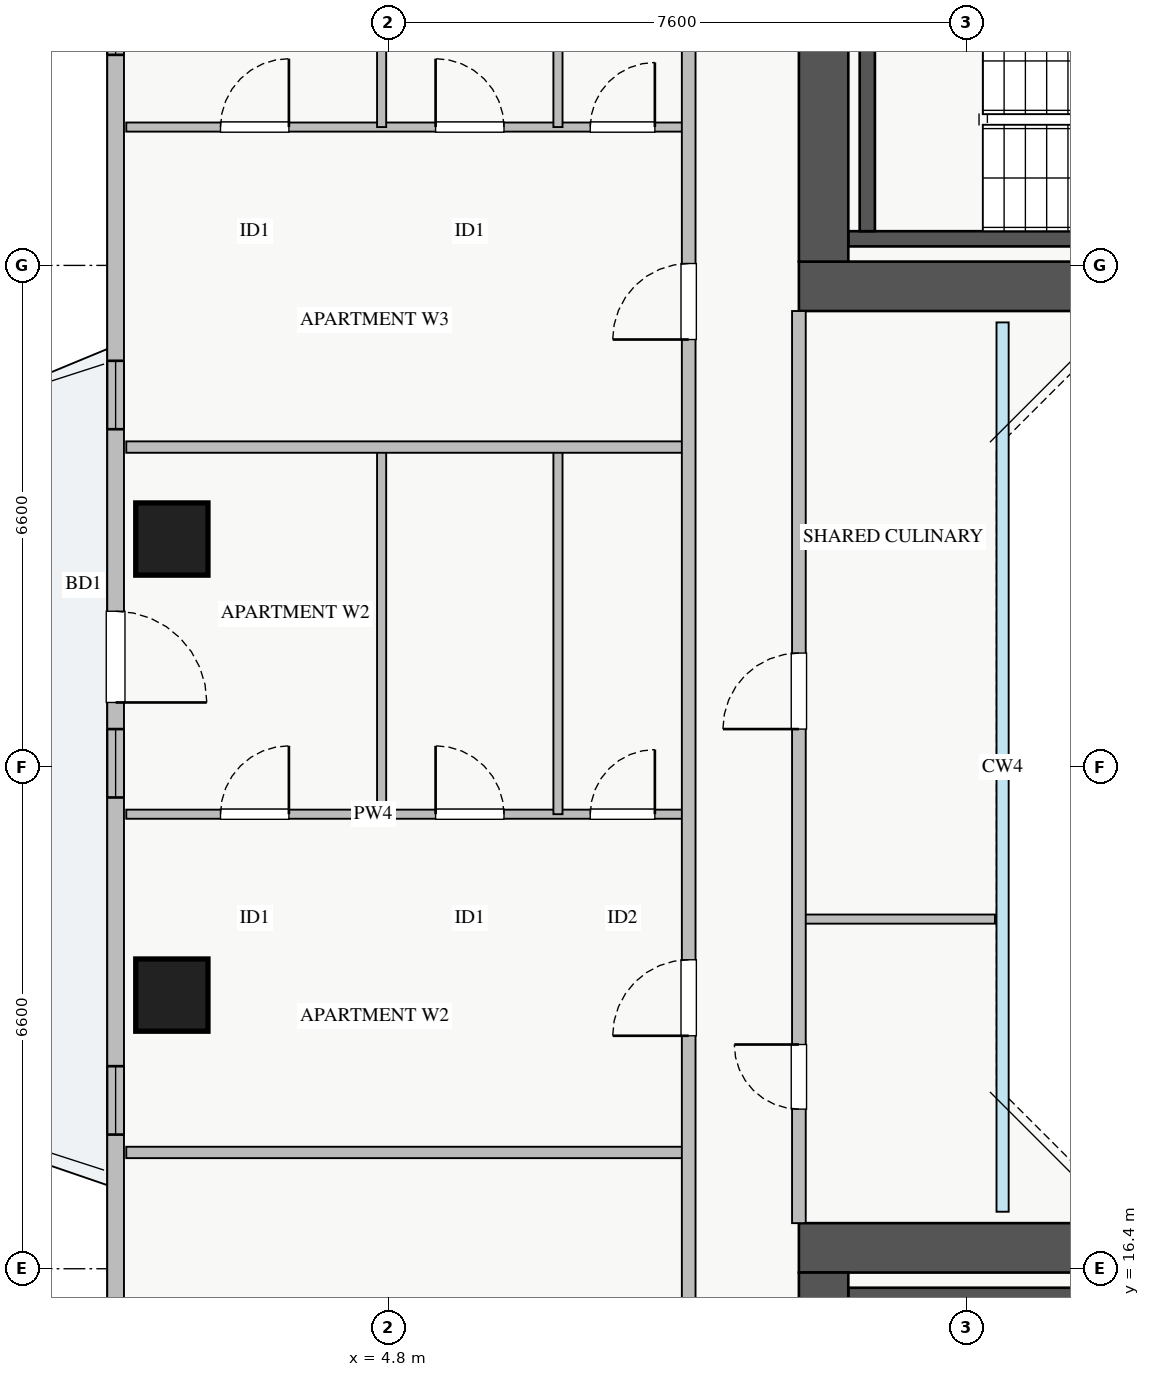
"""IFC4 building model, lengths in metres.
Left out: names, types, materials, properties, quantities, classifications, styles, units other than length and angle.
Written with IfcOpenShell. Run it as: python <this file> out.ifc"""

import sys

from ifc_helpers import new_model, si_unit, direction, frame, frame_2d, origin, origin_2d, place, context, subcontext, project, spatial, rectangle, extrude, source, transform, mapped, element, fill, save


model = new_model("IFC4")
c1 = context("Model", 3, precision=1e-05, world=origin(), true_north=direction((0.0, 1.0)))
c2 = subcontext(c1, "Body", "Model", "MODEL_VIEW")
j1 = project(units=[si_unit("LENGTHUNIT", "METRE"), si_unit("PLANEANGLEUNIT", "RADIAN")], contexts=[c1])
p1 = place(None, origin())
s1 = spatial("IfcSite", under=j1, at=p1, CompositionType="ELEMENT")
p2 = place(p1, origin())
s2 = spatial("IfcBuilding", under=s1, at=p2, CompositionType="ELEMENT")
p3 = place(p2, frame((0.0, 0.0, 150.25)))
s3 = spatial("IfcBuildingStorey", under=s2, at=p3, CompositionType="ELEMENT", Elevation=150.25)
p4 = place(p3, frame((10.85, 29.95, 0.0), z_axis=(0.0, 0.0, 1.0), x_axis=(1.0, 0.0, 0.0)))
e1 = element("IfcWall", 1, at=p4, inside=s3, PredefinedType="SHEAR", context=c2, shape_type="SweptSolid", body=[
    extrude(rectangle(XDim=7.3, YDim=0.2, at=frame_2d((3.65, 0.0))), origin(), (0.0, 0.0, 1.0), 3.25),
])
p5 = place(p3, frame((11.1, 30.05, 0.0), z_axis=(0.0, 0.0, 1.0), x_axis=(0.0, 1.0, 0.0)))
e2 = element("IfcWall", 2, at=p5, inside=s3, PredefinedType="SHEAR", context=c2, shape_type="SweptSolid", body=[
    extrude(rectangle(XDim=2.94, YDim=0.2, at=frame_2d((1.47, 0.0))), origin(), (0.0, 0.0, 1.0), 3.25),
])
p6 = place(p3, frame((10.85, 16.05, 0.0), z_axis=(0.0, 0.0, 1.0), x_axis=(1.0, 0.0, 0.0)))
e3 = element("IfcWall", 3, at=p6, inside=s3, PredefinedType="SHEAR", context=c2, shape_type="SweptSolid", body=[
    extrude(rectangle(XDim=7.3, YDim=0.2, at=frame_2d((3.65, 0.0))), origin(), (0.0, 0.0, 1.0), 3.25),
])
p7 = place(p3, frame((10.2, 29.325, 0.0), z_axis=(0.0, 0.0, 1.0), x_axis=(1.0, 0.0, 0.0)))
e4 = element("IfcWall", 4, at=p7, inside=s3, PredefinedType="SHEAR", context=c2, shape_type="SweptSolid", body=[
    extrude(rectangle(XDim=17.6, YDim=0.65, at=frame_2d((8.8, 0.0))), origin(), (0.0, 0.0, 1.0), 3.25),
])
p8 = place(p3, frame((10.525, 29.65, 0.0), z_axis=(0.0, 0.0, 1.0), x_axis=(0.0, 1.0, 0.0)))
e5 = element("IfcWall", 5, at=p8, inside=s3, PredefinedType="SHEAR", context=c2, shape_type="SweptSolid", body=[
    extrude(rectangle(XDim=5.9, YDim=0.65, at=frame_2d((2.95, 0.0))), origin(), (0.0, 0.0, 1.0), 3.25),
])
p9 = place(p3, frame((10.2, 16.675, 0.0), z_axis=(0.0, 0.0, 1.0), x_axis=(1.0, 0.0, 0.0)))
e6 = element("IfcWall", 6, at=p9, inside=s3, PredefinedType="SHEAR", context=c2, shape_type="SweptSolid", body=[
    extrude(rectangle(XDim=17.6, YDim=0.65, at=frame_2d((8.8, 0.0))), origin(), (0.0, 0.0, 1.0), 3.25),
])
p10 = place(p3, frame((10.525, 10.45, 0.0), z_axis=(0.0, 0.0, 1.0), x_axis=(0.0, 1.0, 0.0)))
e7 = element("IfcWall", 7, at=p10, inside=s3, PredefinedType="SHEAR", context=c2, shape_type="SweptSolid", body=[
    extrude(rectangle(XDim=5.9, YDim=0.65, at=frame_2d((2.95, 0.0))), origin(), (0.0, 0.0, 1.0), 3.25),
])
m1 = source(origin(), c2, "Body", "SweptSolid", [
    extrude(rectangle(XDim=0.95, YDim=0.95, at=origin_2d()), origin(), (0.0, 0.0, 1.0), 3.25),
])
for number, where, z_axis, x_axis in (
    (8, (1.95, 26.0, 0.0), (0.0, 0.0, 1.0), (1.0, 0.0, 0.0)),
    (9, (1.95, 20.0, 0.0), (0.0, 0.0, 1.0), (1.0, 0.0, 0.0)),
):
    element("IfcColumn", number, at=place(p3, frame(where, z_axis=z_axis, x_axis=x_axis)), inside=s3, PredefinedType="COLUMN", context=c2, shape_type="MappedRepresentation", body=[
        mapped(m1, transform((0.0, 0.0, 0.0), x_axis=(1.0, 0.0, 0.0), y_axis=(0.0, 1.0, 0.0), z_axis=(0.0, 0.0, 1.0), scale=1.0)),
    ])
p11 = place(p3, frame((1.21, 10.55, 0.0), z_axis=(0.0, 0.0, 1.0), x_axis=(0.0, 1.0, 0.0)))
e10 = element("IfcWall", 10, at=p11, inside=s3, PredefinedType="STANDARD", context=c2, shape_type="SweptSolid", body=[
    extrude(rectangle(XDim=24.9, YDim=0.22, at=frame_2d((12.45, 0.0))), origin(), (0.0, 0.0, 1.0), 2.61),
])
p12 = place(p11, frame((13.3, 0.0, 0.0)))
e11 = element("IfcOpeningElement", 11, at=p12, cuts=e10, PredefinedType="OPENING", context=c2, shape_type="SweptSolid", body=[
    extrude(rectangle(XDim=1.2, YDim=2.1, at=frame_2d((0.6, 1.05))), frame((0.0, 0.12, 0.0), z_axis=(0.0, -1.0, 0.0), x_axis=(1.0, 0.0, 0.0)), (0.0, 0.0, 1.0), 0.24),
])
p13 = place(p11, frame((1.912, 0.0, 0.9)))
e12 = element("IfcOpeningElement", 12, at=p13, cuts=e10, PredefinedType="OPENING", context=c2, shape_type="SweptSolid", body=[
    extrude(rectangle(XDim=2.4, YDim=1.48, at=frame_2d((1.2, 0.74))), frame((0.0, 0.12, 0.0), z_axis=(0.0, -1.0, 0.0), x_axis=(1.0, 0.0, 0.0)), (0.0, 0.0, 1.0), 0.24),
])
p14 = place(p11, frame((21.82, 0.0, 0.9)))
e13 = element("IfcOpeningElement", 13, at=p14, cuts=e10, PredefinedType="OPENING", context=c2, shape_type="SweptSolid", body=[
    extrude(rectangle(XDim=2.1, YDim=1.5, at=frame_2d((1.05, 0.75))), frame((0.0, 0.12, 0.0), z_axis=(0.0, -1.0, 0.0), x_axis=(1.0, 0.0, 0.0)), (0.0, 0.0, 1.0), 0.24),
])
p15 = place(p11, frame((12.05, 0.0, 0.9)))
e14 = element("IfcOpeningElement", 14, at=p15, cuts=e10, PredefinedType="OPENING", context=c2, shape_type="SweptSolid", body=[
    extrude(rectangle(XDim=0.9, YDim=1.2, at=frame_2d((0.45, 0.6))), frame((0.0, 0.12, 0.0), z_axis=(0.0, -1.0, 0.0), x_axis=(1.0, 0.0, 0.0)), (0.0, 0.0, 1.0), 0.24),
])
p16 = place(p11, frame((7.615, 0.0, 0.9)))
e15 = element("IfcOpeningElement", 15, at=p16, cuts=e10, PredefinedType="OPENING", context=c2, shape_type="SweptSolid", body=[
    extrude(rectangle(XDim=0.9, YDim=1.2, at=frame_2d((0.45, 0.6))), frame((0.0, 0.12, 0.0), z_axis=(0.0, -1.0, 0.0), x_axis=(1.0, 0.0, 0.0)), (0.0, 0.0, 1.0), 0.24),
])
p17 = place(p11, frame((16.895, 0.0, 0.9)))
e16 = element("IfcOpeningElement", 16, at=p17, cuts=e10, PredefinedType="OPENING", context=c2, shape_type="SweptSolid", body=[
    extrude(rectangle(XDim=0.9, YDim=1.2, at=frame_2d((0.45, 0.6))), frame((0.0, 0.12, 0.0), z_axis=(0.0, -1.0, 0.0), x_axis=(1.0, 0.0, 0.0)), (0.0, 0.0, 1.0), 0.24),
])
p18 = place(p3, frame((1.35, 22.38, 0.0), z_axis=(0.0, 0.0, 1.0), x_axis=(1.0, 0.0, 0.0)))
e17 = element("IfcWall", 17, at=p18, inside=s3, PredefinedType="PLUMBINGWALL", context=c2, shape_type="SweptSolid", body=[
    extrude(rectangle(XDim=7.4, YDim=0.12, at=frame_2d((3.7, 0.0))), origin(), (0.0, 0.0, 1.0), 3.07),
])
p19 = place(p18, frame((1.24, 0.0, 0.0)))
e18 = element("IfcOpeningElement", 18, at=p19, cuts=e17, PredefinedType="OPENING", context=c2, shape_type="SweptSolid", body=[
    extrude(rectangle(XDim=0.9, YDim=2.05, at=frame_2d((0.45, 1.025))), frame((0.0, 0.07, 0.0), z_axis=(0.0, -1.0, 0.0), x_axis=(1.0, 0.0, 0.0)), (0.0, 0.0, 1.0), 0.14),
])
p20 = place(p18, frame((4.07, 0.0, 0.0)))
e19 = element("IfcOpeningElement", 19, at=p20, cuts=e17, PredefinedType="OPENING", context=c2, shape_type="SweptSolid", body=[
    extrude(rectangle(XDim=0.9, YDim=2.05, at=frame_2d((0.45, 1.025))), frame((0.0, 0.07, 0.0), z_axis=(0.0, -1.0, 0.0), x_axis=(1.0, 0.0, 0.0)), (0.0, 0.0, 1.0), 0.14),
])
p21 = place(p18, frame((6.105, 0.0, 0.0)))
e20 = element("IfcOpeningElement", 20, at=p21, cuts=e17, PredefinedType="OPENING", context=c2, shape_type="SweptSolid", body=[
    extrude(rectangle(XDim=0.85, YDim=2.05, at=frame_2d((0.425, 1.025))), frame((0.0, 0.07, 0.0), z_axis=(0.0, -1.0, 0.0), x_axis=(1.0, 0.0, 0.0)), (0.0, 0.0, 1.0), 0.14),
])
for number, where, z_axis, x_axis in (
    (21, (4.71, 22.38, 0.0), (0.0, 0.0, 1.0), (0.0, 1.0, 0.0)),
    (22, (7.03, 22.38, 0.0), (0.0, 0.0, 1.0), (0.0, 1.0, 0.0)),
):
    element("IfcWall", number, at=place(p3, frame(where, z_axis=z_axis, x_axis=x_axis)), inside=s3, PredefinedType="PLUMBINGWALL", context=c2, shape_type="SweptSolid", body=[
        extrude(rectangle(XDim=4.83, YDim=0.12, at=frame_2d((2.415, 0.0))), origin(), (0.0, 0.0, 1.0), 3.07),
    ])
p22 = place(p3, frame((1.35, 17.93, 0.0), z_axis=(0.0, 0.0, 1.0), x_axis=(1.0, 0.0, 0.0)))
e23 = element("IfcWall", 23, at=p22, inside=s3, PredefinedType="PARTITIONING", context=c2, shape_type="SweptSolid", body=[
    extrude(rectangle(XDim=7.4, YDim=0.15, at=frame_2d((3.7, 0.0))), origin(), (0.0, 0.0, 1.0), 3.07),
])
p23 = place(p3, frame((1.35, 31.42, 0.0), z_axis=(0.0, 0.0, 1.0), x_axis=(1.0, 0.0, 0.0)))
e24 = element("IfcWall", 24, at=p23, inside=s3, PredefinedType="PLUMBINGWALL", context=c2, shape_type="SweptSolid", body=[
    extrude(rectangle(XDim=7.4, YDim=0.12, at=frame_2d((3.7, 0.0))), origin(), (0.0, 0.0, 1.0), 3.07),
])
p24 = place(p23, frame((1.24, 0.0, 0.0)))
e25 = element("IfcOpeningElement", 25, at=p24, cuts=e24, PredefinedType="OPENING", context=c2, shape_type="SweptSolid", body=[
    extrude(rectangle(XDim=0.9, YDim=2.05, at=frame_2d((0.45, 1.025))), frame((0.0, 0.07, 0.0), z_axis=(0.0, -1.0, 0.0), x_axis=(1.0, 0.0, 0.0)), (0.0, 0.0, 1.0), 0.14),
])
p25 = place(p23, frame((4.07, 0.0, 0.0)))
e26 = element("IfcOpeningElement", 26, at=p25, cuts=e24, PredefinedType="OPENING", context=c2, shape_type="SweptSolid", body=[
    extrude(rectangle(XDim=0.9, YDim=2.05, at=frame_2d((0.45, 1.025))), frame((0.0, 0.07, 0.0), z_axis=(0.0, -1.0, 0.0), x_axis=(1.0, 0.0, 0.0)), (0.0, 0.0, 1.0), 0.14),
])
p26 = place(p23, frame((6.105, 0.0, 0.0)))
e27 = element("IfcOpeningElement", 27, at=p26, cuts=e24, PredefinedType="OPENING", context=c2, shape_type="SweptSolid", body=[
    extrude(rectangle(XDim=0.85, YDim=2.05, at=frame_2d((0.425, 1.025))), frame((0.0, 0.07, 0.0), z_axis=(0.0, -1.0, 0.0), x_axis=(1.0, 0.0, 0.0)), (0.0, 0.0, 1.0), 0.14),
])
p27 = place(p3, frame((4.71, 31.42, 0.0), z_axis=(0.0, 0.0, 1.0), x_axis=(0.0, 1.0, 0.0)))
e28 = element("IfcWall", 28, at=p27, inside=s3, PredefinedType="PLUMBINGWALL", context=c2, shape_type="SweptSolid", body=[
    extrude(rectangle(XDim=4.56, YDim=0.12, at=frame_2d((2.28, 0.0))), origin(), (0.0, 0.0, 1.0), 3.07),
])
p28 = place(p3, frame((7.03, 31.42, 0.0), z_axis=(0.0, 0.0, 1.0), x_axis=(0.0, 1.0, 0.0)))
e29 = element("IfcWall", 29, at=p28, inside=s3, PredefinedType="PLUMBINGWALL", context=c2, shape_type="SweptSolid", body=[
    extrude(rectangle(XDim=4.56, YDim=0.12, at=frame_2d((2.28, 0.0))), origin(), (0.0, 0.0, 1.0), 2.577),
])
p29 = place(p3, frame((1.35, 27.21, 0.0), z_axis=(0.0, 0.0, 1.0), x_axis=(1.0, 0.0, 0.0)))
e30 = element("IfcWall", 30, at=p29, inside=s3, PredefinedType="PARTITIONING", context=c2, shape_type="SweptSolid", body=[
    extrude(rectangle(XDim=7.4, YDim=0.15, at=frame_2d((3.7, 0.0))), origin(), (0.0, 0.0, 1.0), 3.07),
])
p30 = place(p3, frame((8.75, 8.3, 0.0), z_axis=(0.0, 0.0, 1.0), x_axis=(0.0, 1.0, 0.0)))
e31 = element("IfcWall", 31, at=p30, inside=s3, PredefinedType="PARTITIONING", context=c2, shape_type="SweptSolid", body=[
    extrude(rectangle(XDim=29.4, YDim=0.18, at=frame_2d((14.7, 0.0))), origin(), (0.0, 0.0, 1.0), 3.07),
])
p31 = place(p30, frame((28.08, 0.0, 0.0)))
e32 = element("IfcOpeningElement", 32, at=p31, cuts=e31, PredefinedType="OPENING", context=c2, shape_type="SweptSolid", body=[
    extrude(rectangle(XDim=0.9, YDim=2.05, at=frame_2d((0.45, 1.025))), frame((0.0, 0.1, 0.0), z_axis=(0.0, -1.0, 0.0), x_axis=(1.0, 0.0, 0.0)), (0.0, 0.0, 1.0), 0.2),
])
p32 = place(p30, frame((0.245, 0.0, 0.0)))
e33 = element("IfcOpeningElement", 33, at=p32, cuts=e31, PredefinedType="OPENING", context=c2, shape_type="SweptSolid", body=[
    extrude(rectangle(XDim=0.9, YDim=2.05, at=frame_2d((0.45, 1.025))), frame((0.0, 0.1, 0.0), z_axis=(0.0, -1.0, 0.0), x_axis=(1.0, 0.0, 0.0)), (0.0, 0.0, 1.0), 0.2),
])
p33 = place(p30, frame((5.0, 0.0, 0.0)))
e34 = element("IfcOpeningElement", 34, at=p33, cuts=e31, PredefinedType="OPENING", context=c2, shape_type="SweptSolid", body=[
    extrude(rectangle(XDim=1.0, YDim=2.05, at=frame_2d((0.5, 1.025))), frame((0.0, 0.1, 0.0), z_axis=(0.0, -1.0, 0.0), x_axis=(1.0, 0.0, 0.0)), (0.0, 0.0, 1.0), 0.2),
])
p34 = place(p30, frame((11.165, 0.0, 0.0)))
e35 = element("IfcOpeningElement", 35, at=p34, cuts=e31, PredefinedType="OPENING", context=c2, shape_type="SweptSolid", body=[
    extrude(rectangle(XDim=1.0, YDim=2.05, at=frame_2d((0.5, 1.025))), frame((0.0, 0.1, 0.0), z_axis=(0.0, -1.0, 0.0), x_axis=(1.0, 0.0, 0.0)), (0.0, 0.0, 1.0), 0.2),
])
p35 = place(p30, frame((20.325, 0.0, 0.0)))
e36 = element("IfcOpeningElement", 36, at=p35, cuts=e31, PredefinedType="OPENING", context=c2, shape_type="SweptSolid", body=[
    extrude(rectangle(XDim=1.0, YDim=2.05, at=frame_2d((0.5, 1.025))), frame((0.0, 0.1, 0.0), z_axis=(0.0, -1.0, 0.0), x_axis=(1.0, 0.0, 0.0)), (0.0, 0.0, 1.0), 0.2),
])
p36 = place(p3, frame((10.2, 21.0, 0.0), z_axis=(0.0, 0.0, 1.0), x_axis=(1.0, 0.0, 0.0)))
e37 = element("IfcWall", 37, at=p36, inside=s3, PredefinedType="PLUMBINGWALL", context=c2, shape_type="SweptSolid", body=[
    extrude(rectangle(XDim=2.58, YDim=0.12, at=frame_2d((1.29, 0.0))), origin(), (0.0, 0.0, 1.0), 3.07),
])
p37 = place(p3, frame((10.2, 17.0, 0.0), z_axis=(0.0, 0.0, 1.0), x_axis=(0.0, 1.0, 0.0)))
e38 = element("IfcWall", 38, at=p37, inside=s3, PredefinedType="PARTITIONING", context=c2, shape_type="SweptSolid", body=[
    extrude(rectangle(XDim=12.0, YDim=0.18, at=frame_2d((6.0, 0.0))), origin(), (0.0, 0.0, 1.0), 3.07),
])
p38 = place(p37, frame((1.5, 0.0, 0.0)))
e39 = element("IfcOpeningElement", 39, at=p38, cuts=e38, PredefinedType="OPENING", context=c2, shape_type="SweptSolid", body=[
    extrude(rectangle(XDim=0.85, YDim=2.05, at=frame_2d((0.425, 1.025))), frame((0.0, 0.1, 0.0), z_axis=(0.0, -1.0, 0.0), x_axis=(1.0, 0.0, 0.0)), (0.0, 0.0, 1.0), 0.2),
])
p39 = place(p37, frame((6.5, 0.0, 0.0)))
e40 = element("IfcOpeningElement", 40, at=p39, cuts=e38, PredefinedType="OPENING", context=c2, shape_type="SweptSolid", body=[
    extrude(rectangle(XDim=1.0, YDim=2.05, at=frame_2d((0.5, 1.025))), frame((0.0, 0.1, 0.0), z_axis=(0.0, -1.0, 0.0), x_axis=(1.0, 0.0, 0.0)), (0.0, 0.0, 1.0), 0.2),
])
m2 = source(origin(), c2, "Body", "SweptSolid", [
    extrude(rectangle(XDim=1.2, YDim=2.1, at=frame_2d((0.6, 1.05))), frame((0.0, 0.025, 0.0), z_axis=(0.0, -1.0, 0.0), x_axis=(1.0, 0.0, 0.0)), (0.0, 0.0, 1.0), 0.05),
])
p40 = place(p12, frame((1.2, 0.0, 0.0), z_axis=(0.0, 0.0, 1.0), x_axis=(-1.0, 0.0, 0.0)))
e41 = element("IfcDoor", 41, at=p40, inside=s3, OperationType="SINGLE_SWING_LEFT", PredefinedType="DOOR", context=c2, shape_type="MappedRepresentation", body=[
    mapped(m2, transform((0.0, 0.0, 0.0), x_axis=(1.0, 0.0, 0.0), y_axis=(0.0, 1.0, 0.0), z_axis=(0.0, 0.0, 1.0), scale=1.0)),
])
fill(e11, e41)
m3 = source(origin(), c2, "Body", "SweptSolid", [
    extrude(rectangle(XDim=2.1, YDim=1.5, at=frame_2d((1.05, 0.75))), frame((0.0, 0.03, 0.0), z_axis=(0.0, -1.0, 0.0), x_axis=(1.0, 0.0, 0.0)), (0.0, 0.0, 1.0), 0.06),
])
p41 = place(p14, origin())
e42 = element("IfcWindow", 42, at=p41, inside=s3, PartitioningType="TRIPLE_PANEL_VERTICAL", PredefinedType="WINDOW", context=c2, shape_type="MappedRepresentation", body=[
    mapped(m3, transform((0.0, 0.0, 0.0), x_axis=(1.0, 0.0, 0.0), y_axis=(0.0, 1.0, 0.0), z_axis=(0.0, 0.0, 1.0), scale=1.0)),
])
fill(e13, e42)
m4 = source(origin(), c2, "Body", "SweptSolid", [
    extrude(rectangle(XDim=0.9, YDim=2.05, at=frame_2d((0.45, 1.025))), frame((0.0, 0.025, 0.0), z_axis=(0.0, -1.0, 0.0), x_axis=(1.0, 0.0, 0.0)), (0.0, 0.0, 1.0), 0.05),
])
p42 = place(p19, origin())
e43 = element("IfcDoor", 43, at=p42, inside=s3, OperationType="SINGLE_SWING_RIGHT", PredefinedType="DOOR", context=c2, shape_type="MappedRepresentation", body=[
    mapped(m4, transform((0.0, 0.0, 0.0), x_axis=(1.0, 0.0, 0.0), y_axis=(0.0, 1.0, 0.0), z_axis=(0.0, 0.0, 1.0), scale=1.0)),
])
fill(e18, e43)
p43 = place(p20, origin())
e44 = element("IfcDoor", 44, at=p43, inside=s3, OperationType="SINGLE_SWING_LEFT", PredefinedType="DOOR", context=c2, shape_type="MappedRepresentation", body=[
    mapped(m4, transform((0.0, 0.0, 0.0), x_axis=(1.0, 0.0, 0.0), y_axis=(0.0, 1.0, 0.0), z_axis=(0.0, 0.0, 1.0), scale=1.0)),
])
fill(e19, e44)
m5 = source(origin(), c2, "Body", "SweptSolid", [
    extrude(rectangle(XDim=0.85, YDim=2.05, at=frame_2d((0.425, 1.025))), frame((0.0, 0.025, 0.0), z_axis=(0.0, -1.0, 0.0), x_axis=(1.0, 0.0, 0.0)), (0.0, 0.0, 1.0), 0.05),
])
p44 = place(p21, origin())
e45 = element("IfcDoor", 45, at=p44, inside=s3, OperationType="SINGLE_SWING_RIGHT", PredefinedType="DOOR", context=c2, shape_type="MappedRepresentation", body=[
    mapped(m5, transform((0.0, 0.0, 0.0), x_axis=(1.0, 0.0, 0.0), y_axis=(0.0, 1.0, 0.0), z_axis=(0.0, 0.0, 1.0), scale=1.0)),
])
fill(e20, e45)
p45 = place(p24, origin())
e46 = element("IfcDoor", 46, at=p45, inside=s3, OperationType="SINGLE_SWING_RIGHT", PredefinedType="DOOR", context=c2, shape_type="MappedRepresentation", body=[
    mapped(m4, transform((0.0, 0.0, 0.0), x_axis=(1.0, 0.0, 0.0), y_axis=(0.0, 1.0, 0.0), z_axis=(0.0, 0.0, 1.0), scale=1.0)),
])
fill(e25, e46)
p46 = place(p25, origin())
e47 = element("IfcDoor", 47, at=p46, inside=s3, OperationType="SINGLE_SWING_LEFT", PredefinedType="DOOR", context=c2, shape_type="MappedRepresentation", body=[
    mapped(m4, transform((0.0, 0.0, 0.0), x_axis=(1.0, 0.0, 0.0), y_axis=(0.0, 1.0, 0.0), z_axis=(0.0, 0.0, 1.0), scale=1.0)),
])
fill(e26, e47)
p47 = place(p26, origin())
e48 = element("IfcDoor", 48, at=p47, inside=s3, OperationType="SINGLE_SWING_RIGHT", PredefinedType="DOOR", context=c2, shape_type="MappedRepresentation", body=[
    mapped(m5, transform((0.0, 0.0, 0.0), x_axis=(1.0, 0.0, 0.0), y_axis=(0.0, 1.0, 0.0), z_axis=(0.0, 0.0, 1.0), scale=1.0)),
])
fill(e27, e48)
m6 = source(origin(), c2, "Body", "SweptSolid", [
    extrude(rectangle(XDim=1.0, YDim=2.05, at=frame_2d((0.5, 1.025))), frame((0.0, 0.025, 0.0), z_axis=(0.0, -1.0, 0.0), x_axis=(1.0, 0.0, 0.0)), (0.0, 0.0, 1.0), 0.05),
])
p48 = place(p34, origin())
e49 = element("IfcDoor", 49, at=p48, inside=s3, OperationType="SINGLE_SWING_LEFT", PredefinedType="DOOR", context=c2, shape_type="MappedRepresentation", body=[
    mapped(m6, transform((0.0, 0.0, 0.0), x_axis=(1.0, 0.0, 0.0), y_axis=(0.0, 1.0, 0.0), z_axis=(0.0, 0.0, 1.0), scale=1.0)),
])
fill(e35, e49)
p49 = place(p35, origin())
e50 = element("IfcDoor", 50, at=p49, inside=s3, OperationType="SINGLE_SWING_LEFT", PredefinedType="DOOR", context=c2, shape_type="MappedRepresentation", body=[
    mapped(m6, transform((0.0, 0.0, 0.0), x_axis=(1.0, 0.0, 0.0), y_axis=(0.0, 1.0, 0.0), z_axis=(0.0, 0.0, 1.0), scale=1.0)),
])
fill(e36, e50)
p50 = place(p38, origin())
e51 = element("IfcDoor", 51, at=p50, inside=s3, OperationType="SINGLE_SWING_RIGHT", PredefinedType="DOOR", context=c2, shape_type="MappedRepresentation", body=[
    mapped(m5, transform((0.0, 0.0, 0.0), x_axis=(1.0, 0.0, 0.0), y_axis=(0.0, 1.0, 0.0), z_axis=(0.0, 0.0, 1.0), scale=1.0)),
])
fill(e39, e51)
p51 = place(p39, origin())
e52 = element("IfcDoor", 52, at=p51, inside=s3, OperationType="SINGLE_SWING_LEFT", PredefinedType="DOOR", context=c2, shape_type="MappedRepresentation", body=[
    mapped(m6, transform((0.0, 0.0, 0.0), x_axis=(1.0, 0.0, 0.0), y_axis=(0.0, 1.0, 0.0), z_axis=(0.0, 0.0, 1.0), scale=1.0)),
])
fill(e40, e52)
m7 = source(origin(), c2, "Body", "SweptSolid", [
    extrude(rectangle(XDim=0.9, YDim=1.2, at=frame_2d((0.45, 0.6))), frame((0.0, 0.03, 0.0), z_axis=(0.0, -1.0, 0.0), x_axis=(1.0, 0.0, 0.0)), (0.0, 0.0, 1.0), 0.06),
])
p52 = place(p15, origin())
e53 = element("IfcWindow", 53, at=p52, inside=s3, PartitioningType="SINGLE_PANEL", PredefinedType="WINDOW", context=c2, shape_type="MappedRepresentation", body=[
    mapped(m7, transform((0.0, 0.0, 0.0), x_axis=(1.0, 0.0, 0.0), y_axis=(0.0, 1.0, 0.0), z_axis=(0.0, 0.0, 1.0), scale=1.0)),
])
fill(e14, e53)
p53 = place(p16, origin())
e54 = element("IfcWindow", 54, at=p53, inside=s3, PartitioningType="SINGLE_PANEL", PredefinedType="WINDOW", context=c2, shape_type="MappedRepresentation", body=[
    mapped(m7, transform((0.0, 0.0, 0.0), x_axis=(1.0, 0.0, 0.0), y_axis=(0.0, 1.0, 0.0), z_axis=(0.0, 0.0, 1.0), scale=1.0)),
])
fill(e15, e54)
p54 = place(p17, origin())
e55 = element("IfcWindow", 55, at=p54, inside=s3, PartitioningType="SINGLE_PANEL", PredefinedType="WINDOW", context=c2, shape_type="MappedRepresentation", body=[
    mapped(m7, transform((0.0, 0.0, 0.0), x_axis=(1.0, 0.0, 0.0), y_axis=(0.0, 1.0, 0.0), z_axis=(0.0, 0.0, 1.0), scale=1.0)),
])
fill(e16, e55)
save(model, sys.argv[1])
